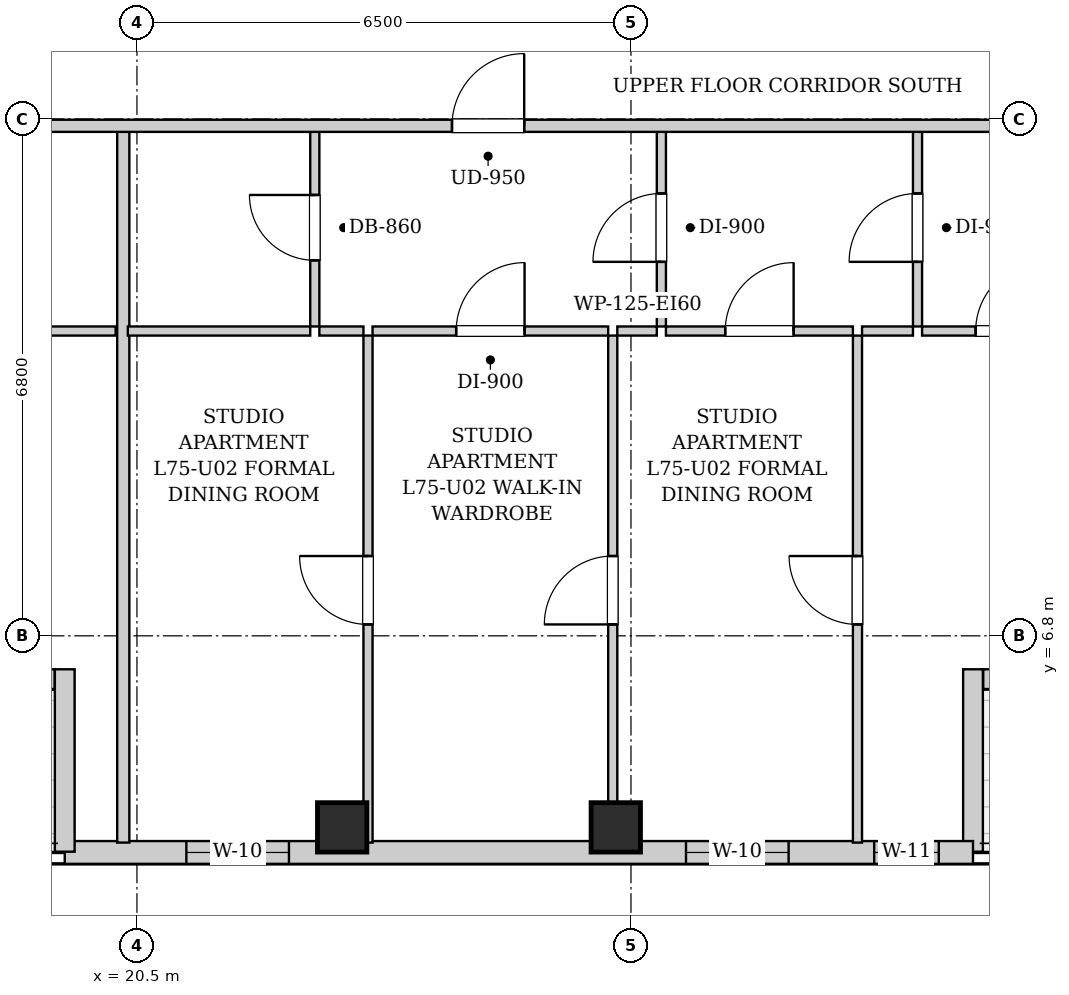
"""IFC4 building model, lengths in metres.
Left out: names, types, materials, properties, quantities, classifications, styles, units other than length and angle.
Written with IfcOpenShell. Run it as: python <this file> out.ifc"""

import sys

from ifc_helpers import new_model, si_unit, direction, frame, frame_2d, origin, origin_2d, place, context, subcontext, project, spatial, rectangle, extrude, element, fill, save


model = new_model("IFC4")
c1 = context("Model", 3, precision=1e-05, world=origin(), true_north=direction((0.0, 1.0)))
c2 = subcontext(c1, "Body", "Model", "MODEL_VIEW")
j1 = project(units=[si_unit("LENGTHUNIT", "METRE"), si_unit("PLANEANGLEUNIT", "RADIAN")], contexts=[c1])
p1 = place(None, origin())
s1 = spatial("IfcSite", under=j1, at=p1, CompositionType="ELEMENT")
p2 = place(p1, origin())
s2 = spatial("IfcBuilding", under=s1, at=p2, CompositionType="ELEMENT")
p3 = place(p2, frame((0.0, 0.0, 258.1)))
s3 = spatial("IfcBuildingStorey", under=s2, at=p3, CompositionType="ELEMENT", Elevation=258.1)
for number, where, z_axis, x_axis in (
    (1, (23.2, 4.28, 0.0), (0.0, 0.0, 1.0), (1.0, 0.0, 0.0)),
    (2, (26.8, 4.28, 0.0), (0.0, 0.0, 1.0), (1.0, 0.0, 0.0)),
):
    element("IfcColumn", number, at=place(p3, frame(where, z_axis=z_axis, x_axis=x_axis)), inside=s3, PredefinedType="COLUMN", context=c2, shape_type="SweptSolid", body=[
        extrude(rectangle(XDim=0.65, YDim=0.65, at=origin_2d()), origin(), (0.0, 0.0, 1.0), 3.4),
    ])
p4 = place(p3, frame((36.366, 6.23, 0.0), z_axis=(0.0, 0.0, 1.0), x_axis=(-1.0, 0.0, 0.0)))
e3 = element("IfcWall", 3, at=p4, inside=s3, PredefinedType="SOLIDWALL", context=c2, shape_type="SweptSolid", body=[
    extrude(rectangle(XDim=4.732, YDim=0.26, at=frame_2d((2.366, 0.0))), origin(), (0.0, 0.0, 1.0), 3.05),
])
p5 = place(p4, frame((1.816, 0.0, 0.0)))
e4 = element("IfcOpeningElement", 4, at=p5, cuts=e3, PredefinedType="OPENING", context=c2, shape_type="SweptSolid", body=[
    extrude(rectangle(XDim=1.1, YDim=2.0, at=frame_2d((0.55, 1.0))), frame((0.0, 0.14, 0.0), z_axis=(0.0, -1.0, 0.0), x_axis=(1.0, 0.0, 0.0)), (0.0, 0.0, 1.0), 0.28),
])
p6 = place(p3, frame((31.5, 6.36, 0.0), z_axis=(0.0, 0.0, 1.0), x_axis=(0.0, -1.0, 0.0)))
e5 = element("IfcWall", 5, at=p6, inside=s3, PredefinedType="SOLIDWALL", context=c2, shape_type="SweptSolid", body=[
    extrude(rectangle(XDim=2.4, YDim=0.26, at=frame_2d((1.2, 0.0))), origin(), (0.0, 0.0, 1.0), 3.05),
])
p7 = place(p3, frame((31.5, 3.95, 0.0), z_axis=(0.0, 0.0, 1.0), x_axis=(-1.0, 0.0, 0.0)))
e6 = element("IfcWall", 6, at=p7, inside=s3, PredefinedType="SOLIDWALL", context=c2, shape_type="SweptSolid", body=[
    extrude(rectangle(XDim=11.95, YDim=0.3, at=frame_2d((5.975, 0.0))), origin(), (0.0, 0.0, 1.0), 3.05),
])
p8 = place(p7, frame((9.0, 0.0, 0.55)))
e7 = element("IfcOpeningElement", 7, at=p8, cuts=e6, PredefinedType="OPENING", context=c2, shape_type="SweptSolid", body=[
    extrude(rectangle(XDim=1.35, YDim=1.2, at=frame_2d((0.675, 0.6))), frame((0.0, 0.16, 0.0), z_axis=(0.0, -1.0, 0.0), x_axis=(1.0, 0.0, 0.0)), (0.0, 0.0, 1.0), 0.32),
])
p9 = place(p7, frame((2.426, 0.0, 0.55)))
e8 = element("IfcOpeningElement", 8, at=p9, cuts=e6, PredefinedType="OPENING", context=c2, shape_type="SweptSolid", body=[
    extrude(rectangle(XDim=1.35, YDim=1.2, at=frame_2d((0.675, 0.6))), frame((0.0, 0.16, 0.0), z_axis=(0.0, -1.0, 0.0), x_axis=(1.0, 0.0, 0.0)), (0.0, 0.0, 1.0), 0.32),
])
p10 = place(p7, frame((0.45, 0.0, 0.55)))
e9 = element("IfcOpeningElement", 9, at=p10, cuts=e6, PredefinedType="OPENING", context=c2, shape_type="SweptSolid", body=[
    extrude(rectangle(XDim=0.85, YDim=1.2, at=frame_2d((0.425, 0.6))), frame((0.0, 0.16, 0.0), z_axis=(0.0, -1.0, 0.0), x_axis=(1.0, 0.0, 0.0)), (0.0, 0.0, 1.0), 0.32),
])
p11 = place(p3, frame((19.55, 3.96, 0.0), z_axis=(0.0, 0.0, 1.0), x_axis=(0.0, 1.0, 0.0)))
e10 = element("IfcWall", 10, at=p11, inside=s3, PredefinedType="SOLIDWALL", context=c2, shape_type="SweptSolid", body=[
    extrude(rectangle(XDim=2.4, YDim=0.26, at=frame_2d((1.2, 0.0))), origin(), (0.0, 0.0, 1.0), 3.05),
])
p12 = place(p3, frame((19.416, 6.23, 0.0), z_axis=(0.0, 0.0, 1.0), x_axis=(-1.0, 0.0, 0.0)))
e11 = element("IfcWall", 11, at=p12, inside=s3, PredefinedType="SOLIDWALL", context=c2, shape_type="SweptSolid", body=[
    extrude(rectangle(XDim=4.882, YDim=0.26, at=frame_2d((2.441, 0.0))), origin(), (0.0, 0.0, 1.0), 3.05),
])
p13 = place(p12, frame((1.891, 0.0, 0.0)))
e12 = element("IfcOpeningElement", 12, at=p13, cuts=e11, PredefinedType="OPENING", context=c2, shape_type="SweptSolid", body=[
    extrude(rectangle(XDim=1.1, YDim=2.0, at=frame_2d((0.55, 1.0))), frame((0.0, 0.14, 0.0), z_axis=(0.0, -1.0, 0.0), x_axis=(1.0, 0.0, 0.0)), (0.0, 0.0, 1.0), 0.28),
])
p14 = place(p3, frame((15.412, 10.81, 0.0), z_axis=(0.0, 0.0, 1.0), x_axis=(1.0, 0.0, 0.0)))
e13 = element("IfcWall", 13, at=p14, inside=s3, PredefinedType="PARTITIONING", context=c2, shape_type="SweptSolid", body=[
    extrude(rectangle(XDim=4.808, YDim=0.12, at=frame_2d((2.404, 0.0))), origin(), (0.0, 0.0, 1.0), 3.05),
])
p15 = place(p14, frame((1.954, 0.0, 0.0)))
e14 = element("IfcOpeningElement", 14, at=p15, cuts=e13, PredefinedType="OPENING", context=c2, shape_type="SweptSolid", body=[
    extrude(rectangle(XDim=0.9, YDim=2.05, at=frame_2d((0.45, 1.025))), frame((0.0, 0.07, 0.0), z_axis=(0.0, -1.0, 0.0), x_axis=(1.0, 0.0, 0.0)), (0.0, 0.0, 1.0), 0.14),
])
p16 = place(p3, frame((20.32, 4.08, 0.0), z_axis=(0.0, 0.0, 1.0), x_axis=(0.0, 1.0, 0.0)))
e15 = element("IfcWall", 15, at=p16, inside=s3, PredefinedType="PARTITIONING", context=c2, shape_type="SweptSolid", body=[
    extrude(rectangle(XDim=9.39, YDim=0.16, at=frame_2d((4.695, 0.0))), origin(), (0.0, 0.0, 1.0), 3.05),
])
p17 = place(p3, frame((22.84, 10.87, 0.0), z_axis=(0.0, 0.0, 1.0), x_axis=(0.0, 1.0, 0.0)))
e16 = element("IfcWall", 16, at=p17, inside=s3, PredefinedType="PARTITIONING", context=c2, shape_type="SweptSolid", body=[
    extrude(rectangle(XDim=2.6, YDim=0.12, at=frame_2d((1.3, 0.0))), origin(), (0.0, 0.0, 1.0), 3.05),
])
p18 = place(p17, frame((0.87, 0.0, 0.0)))
e17 = element("IfcOpeningElement", 17, at=p18, cuts=e16, PredefinedType="OPENING", context=c2, shape_type="SweptSolid", body=[
    extrude(rectangle(XDim=0.86, YDim=2.05, at=frame_2d((0.43, 1.025))), frame((0.0, 0.07, 0.0), z_axis=(0.0, -1.0, 0.0), x_axis=(1.0, 0.0, 0.0)), (0.0, 0.0, 1.0), 0.14),
])
p19 = place(p3, frame((20.38, 10.81, 0.0), z_axis=(0.0, 0.0, 1.0), x_axis=(1.0, 0.0, 0.0)))
e18 = element("IfcWall", 18, at=p19, inside=s3, PredefinedType="PARTITIONING", context=c2, shape_type="SweptSolid", body=[
    extrude(rectangle(XDim=2.4, YDim=0.12, at=frame_2d((1.2, 0.0))), origin(), (0.0, 0.0, 1.0), 3.05),
])
p20 = place(p3, frame((27.4, 10.87, 0.0), z_axis=(0.0, 0.0, 1.0), x_axis=(0.0, 1.0, 0.0)))
e19 = element("IfcWall", 19, at=p20, inside=s3, PredefinedType="PARTITIONING", context=c2, shape_type="SweptSolid", body=[
    extrude(rectangle(XDim=2.6, YDim=0.12, at=frame_2d((1.3, 0.0))), origin(), (0.0, 0.0, 1.0), 3.05),
])
p21 = place(p20, frame((0.85, 0.0, 0.0)))
e20 = element("IfcOpeningElement", 20, at=p21, cuts=e19, PredefinedType="OPENING", context=c2, shape_type="SweptSolid", body=[
    extrude(rectangle(XDim=0.9, YDim=2.05, at=frame_2d((0.45, 1.025))), frame((0.0, 0.07, 0.0), z_axis=(0.0, -1.0, 0.0), x_axis=(1.0, 0.0, 0.0)), (0.0, 0.0, 1.0), 0.14),
])
p22 = place(p3, frame((22.9, 10.81, 0.0), z_axis=(0.0, 0.0, 1.0), x_axis=(1.0, 0.0, 0.0)))
e21 = element("IfcWall", 21, at=p22, inside=s3, PredefinedType="PARTITIONING", context=c2, shape_type="SweptSolid", body=[
    extrude(rectangle(XDim=0.58, YDim=0.12, at=frame_2d((0.29, 0.0))), origin(), (0.0, 0.0, 1.0), 3.05),
])
p23 = place(p3, frame((23.6, 10.81, 0.0), z_axis=(0.0, 0.0, 1.0), x_axis=(1.0, 0.0, 0.0)))
e22 = element("IfcWall", 22, at=p23, inside=s3, PredefinedType="PARTITIONING", context=c2, shape_type="SweptSolid", body=[
    extrude(rectangle(XDim=3.1, YDim=0.12, at=frame_2d((1.55, 0.0))), origin(), (0.0, 0.0, 1.0), 3.05),
])
p24 = place(p23, frame((1.1, 0.0, 0.0)))
e23 = element("IfcOpeningElement", 23, at=p24, cuts=e22, PredefinedType="OPENING", context=c2, shape_type="SweptSolid", body=[
    extrude(rectangle(XDim=0.9, YDim=2.05, at=frame_2d((0.45, 1.025))), frame((0.0, 0.07, 0.0), z_axis=(0.0, -1.0, 0.0), x_axis=(1.0, 0.0, 0.0)), (0.0, 0.0, 1.0), 0.14),
])
p25 = place(p3, frame((26.82, 10.81, 0.0), z_axis=(0.0, 0.0, 1.0), x_axis=(1.0, 0.0, 0.0)))
e24 = element("IfcWall", 24, at=p25, inside=s3, PredefinedType="PARTITIONING", context=c2, shape_type="SweptSolid", body=[
    extrude(rectangle(XDim=0.52, YDim=0.12, at=frame_2d((0.26, 0.0))), origin(), (0.0, 0.0, 1.0), 3.05),
])
p26 = place(p3, frame((30.77, 10.87, 0.0), z_axis=(0.0, 0.0, 1.0), x_axis=(0.0, 1.0, 0.0)))
e25 = element("IfcWall", 25, at=p26, inside=s3, PredefinedType="PARTITIONING", context=c2, shape_type="SweptSolid", body=[
    extrude(rectangle(XDim=2.6, YDim=0.12, at=frame_2d((1.3, 0.0))), origin(), (0.0, 0.0, 1.0), 3.05),
])
p27 = place(p26, frame((0.85, 0.0, 0.0)))
e26 = element("IfcOpeningElement", 26, at=p27, cuts=e25, PredefinedType="OPENING", context=c2, shape_type="SweptSolid", body=[
    extrude(rectangle(XDim=0.9, YDim=2.05, at=frame_2d((0.45, 1.025))), frame((0.0, 0.07, 0.0), z_axis=(0.0, -1.0, 0.0), x_axis=(1.0, 0.0, 0.0)), (0.0, 0.0, 1.0), 0.14),
])
p28 = place(p3, frame((27.46, 10.81, 0.0), z_axis=(0.0, 0.0, 1.0), x_axis=(1.0, 0.0, 0.0)))
e27 = element("IfcWall", 27, at=p28, inside=s3, PredefinedType="PARTITIONING", context=c2, shape_type="SweptSolid", body=[
    extrude(rectangle(XDim=2.46, YDim=0.12, at=frame_2d((1.23, 0.0))), origin(), (0.0, 0.0, 1.0), 3.05),
])
p29 = place(p28, frame((0.78, 0.0, 0.0)))
e28 = element("IfcOpeningElement", 28, at=p29, cuts=e27, PredefinedType="OPENING", context=c2, shape_type="SweptSolid", body=[
    extrude(rectangle(XDim=0.9, YDim=2.05, at=frame_2d((0.45, 1.025))), frame((0.0, 0.07, 0.0), z_axis=(0.0, -1.0, 0.0), x_axis=(1.0, 0.0, 0.0)), (0.0, 0.0, 1.0), 0.14),
])
p30 = place(p3, frame((30.04, 10.81, 0.0), z_axis=(0.0, 0.0, 1.0), x_axis=(1.0, 0.0, 0.0)))
e29 = element("IfcWall", 29, at=p30, inside=s3, PredefinedType="PARTITIONING", context=c2, shape_type="SweptSolid", body=[
    extrude(rectangle(XDim=0.67, YDim=0.12, at=frame_2d((0.335, 0.0))), origin(), (0.0, 0.0, 1.0), 3.05),
])
p31 = place(p3, frame((30.83, 10.81, 0.0), z_axis=(0.0, 0.0, 1.0), x_axis=(1.0, 0.0, 0.0)))
e30 = element("IfcWall", 30, at=p31, inside=s3, PredefinedType="PARTITIONING", context=c2, shape_type="SweptSolid", body=[
    extrude(rectangle(XDim=2.31, YDim=0.12, at=frame_2d((1.155, 0.0))), origin(), (0.0, 0.0, 1.0), 3.05),
])
p32 = place(p31, frame((0.705, 0.0, 0.0)))
e31 = element("IfcOpeningElement", 31, at=p32, cuts=e30, PredefinedType="OPENING", context=c2, shape_type="SweptSolid", body=[
    extrude(rectangle(XDim=0.9, YDim=2.05, at=frame_2d((0.45, 1.025))), frame((0.0, 0.07, 0.0), z_axis=(0.0, -1.0, 0.0), x_axis=(1.0, 0.0, 0.0)), (0.0, 0.0, 1.0), 0.14),
])
p33 = place(p3, frame((23.54, 4.08, 0.0), z_axis=(0.0, 0.0, 1.0), x_axis=(0.0, 1.0, 0.0)))
e32 = element("IfcWall", 32, at=p33, inside=s3, PredefinedType="PARTITIONING", context=c2, shape_type="SweptSolid", body=[
    extrude(rectangle(XDim=6.67, YDim=0.12, at=frame_2d((3.335, 0.0))), origin(), (0.0, 0.0, 1.0), 3.05),
])
p34 = place(p33, frame((2.87, 0.0, 0.0)))
e33 = element("IfcOpeningElement", 33, at=p34, cuts=e32, PredefinedType="OPENING", context=c2, shape_type="SweptSolid", body=[
    extrude(rectangle(XDim=0.9, YDim=2.05, at=frame_2d((0.45, 1.025))), frame((0.0, 0.07, 0.0), z_axis=(0.0, -1.0, 0.0), x_axis=(1.0, 0.0, 0.0)), (0.0, 0.0, 1.0), 0.14),
])
p35 = place(p3, frame((26.76, 4.08, 0.0), z_axis=(0.0, 0.0, 1.0), x_axis=(0.0, 1.0, 0.0)))
e34 = element("IfcWall", 34, at=p35, inside=s3, PredefinedType="PARTITIONING", context=c2, shape_type="SweptSolid", body=[
    extrude(rectangle(XDim=6.67, YDim=0.12, at=frame_2d((3.335, 0.0))), origin(), (0.0, 0.0, 1.0), 3.05),
])
p36 = place(p35, frame((2.87, 0.0, 0.0)))
e35 = element("IfcOpeningElement", 35, at=p36, cuts=e34, PredefinedType="OPENING", context=c2, shape_type="SweptSolid", body=[
    extrude(rectangle(XDim=0.9, YDim=2.05, at=frame_2d((0.45, 1.025))), frame((0.0, 0.07, 0.0), z_axis=(0.0, -1.0, 0.0), x_axis=(1.0, 0.0, 0.0)), (0.0, 0.0, 1.0), 0.14),
])
p37 = place(p3, frame((29.98, 4.08, 0.0), z_axis=(0.0, 0.0, 1.0), x_axis=(0.0, 1.0, 0.0)))
e36 = element("IfcWall", 36, at=p37, inside=s3, PredefinedType="PARTITIONING", context=c2, shape_type="SweptSolid", body=[
    extrude(rectangle(XDim=6.67, YDim=0.12, at=frame_2d((3.335, 0.0))), origin(), (0.0, 0.0, 1.0), 3.05),
])
p38 = place(p37, frame((2.87, 0.0, 0.0)))
e37 = element("IfcOpeningElement", 37, at=p38, cuts=e36, PredefinedType="OPENING", context=c2, shape_type="SweptSolid", body=[
    extrude(rectangle(XDim=0.9, YDim=2.05, at=frame_2d((0.45, 1.025))), frame((0.0, 0.07, 0.0), z_axis=(0.0, -1.0, 0.0), x_axis=(1.0, 0.0, 0.0)), (0.0, 0.0, 1.0), 0.14),
])
p39 = place(p3, frame((13.15, 13.51, 0.0), z_axis=(0.0, 0.0, 1.0), x_axis=(1.0, 0.0, 0.0)))
e38 = element("IfcWall", 38, at=p39, inside=s3, PredefinedType="PARTITIONING", context=c2, shape_type="SweptSolid", body=[
    extrude(rectangle(XDim=24.6, YDim=0.16, at=frame_2d((12.3, 0.0))), origin(), (0.0, 0.0, 1.0), 3.05),
])
p40 = place(p39, frame((5.185, 0.0, 0.0)))
e39 = element("IfcOpeningElement", 39, at=p40, cuts=e38, PredefinedType="OPENING", context=c2, shape_type="SweptSolid", body=[
    extrude(rectangle(XDim=0.95, YDim=2.1, at=frame_2d((0.475, 1.05))), frame((0.0, 0.09, 0.0), z_axis=(0.0, -1.0, 0.0), x_axis=(1.0, 0.0, 0.0)), (0.0, 0.0, 1.0), 0.18),
])
p41 = place(p39, frame((11.495, 0.0, 0.0)))
e40 = element("IfcOpeningElement", 40, at=p41, cuts=e38, PredefinedType="OPENING", context=c2, shape_type="SweptSolid", body=[
    extrude(rectangle(XDim=0.95, YDim=2.1, at=frame_2d((0.475, 1.05))), frame((0.0, 0.09, 0.0), z_axis=(0.0, -1.0, 0.0), x_axis=(1.0, 0.0, 0.0)), (0.0, 0.0, 1.0), 0.18),
])
p42 = place(p18, origin())
e41 = element("IfcDoor", 41, at=p42, inside=s3, OperationType="SINGLE_SWING_RIGHT", PredefinedType="DOOR", context=c2, shape_type="SweptSolid", body=[
    extrude(rectangle(XDim=0.86, YDim=2.05, at=frame_2d((0.43, 1.025))), frame((0.0, 0.025, 0.0), z_axis=(0.0, -1.0, 0.0), x_axis=(1.0, 0.0, 0.0)), (0.0, 0.0, 1.0), 0.05),
])
fill(e17, e41)
p43 = place(p21, origin())
e42 = element("IfcDoor", 42, at=p43, inside=s3, OperationType="SINGLE_SWING_LEFT", PredefinedType="DOOR", context=c2, shape_type="SweptSolid", body=[
    extrude(rectangle(XDim=0.9, YDim=2.05, at=frame_2d((0.45, 1.025))), frame((0.0, 0.025, 0.0), z_axis=(0.0, -1.0, 0.0), x_axis=(1.0, 0.0, 0.0)), (0.0, 0.0, 1.0), 0.05),
])
fill(e20, e42)
p44 = place(p24, origin())
e43 = element("IfcDoor", 43, at=p44, inside=s3, OperationType="SINGLE_SWING_RIGHT", PredefinedType="DOOR", context=c2, shape_type="SweptSolid", body=[
    extrude(rectangle(XDim=0.9, YDim=2.05, at=frame_2d((0.45, 1.025))), frame((0.0, 0.025, 0.0), z_axis=(0.0, -1.0, 0.0), x_axis=(1.0, 0.0, 0.0)), (0.0, 0.0, 1.0), 0.05),
])
fill(e23, e43)
p45 = place(p27, origin())
e44 = element("IfcDoor", 44, at=p45, inside=s3, OperationType="SINGLE_SWING_LEFT", PredefinedType="DOOR", context=c2, shape_type="SweptSolid", body=[
    extrude(rectangle(XDim=0.9, YDim=2.05, at=frame_2d((0.45, 1.025))), frame((0.0, 0.025, 0.0), z_axis=(0.0, -1.0, 0.0), x_axis=(1.0, 0.0, 0.0)), (0.0, 0.0, 1.0), 0.05),
])
fill(e26, e44)
p46 = place(p29, origin())
e45 = element("IfcDoor", 45, at=p46, inside=s3, OperationType="SINGLE_SWING_RIGHT", PredefinedType="DOOR", context=c2, shape_type="SweptSolid", body=[
    extrude(rectangle(XDim=0.9, YDim=2.05, at=frame_2d((0.45, 1.025))), frame((0.0, 0.025, 0.0), z_axis=(0.0, -1.0, 0.0), x_axis=(1.0, 0.0, 0.0)), (0.0, 0.0, 1.0), 0.05),
])
fill(e28, e45)
p47 = place(p32, origin())
e46 = element("IfcDoor", 46, at=p47, inside=s3, OperationType="SINGLE_SWING_RIGHT", PredefinedType="DOOR", context=c2, shape_type="SweptSolid", body=[
    extrude(rectangle(XDim=0.9, YDim=2.05, at=frame_2d((0.45, 1.025))), frame((0.0, 0.025, 0.0), z_axis=(0.0, -1.0, 0.0), x_axis=(1.0, 0.0, 0.0)), (0.0, 0.0, 1.0), 0.05),
])
fill(e31, e46)
p48 = place(p34, origin())
e47 = element("IfcDoor", 47, at=p48, inside=s3, OperationType="SINGLE_SWING_RIGHT", PredefinedType="DOOR", context=c2, shape_type="SweptSolid", body=[
    extrude(rectangle(XDim=0.9, YDim=2.05, at=frame_2d((0.45, 1.025))), frame((0.0, 0.025, 0.0), z_axis=(0.0, -1.0, 0.0), x_axis=(1.0, 0.0, 0.0)), (0.0, 0.0, 1.0), 0.05),
])
fill(e33, e47)
p49 = place(p36, origin())
e48 = element("IfcDoor", 48, at=p49, inside=s3, OperationType="SINGLE_SWING_LEFT", PredefinedType="DOOR", context=c2, shape_type="SweptSolid", body=[
    extrude(rectangle(XDim=0.9, YDim=2.05, at=frame_2d((0.45, 1.025))), frame((0.0, 0.025, 0.0), z_axis=(0.0, -1.0, 0.0), x_axis=(1.0, 0.0, 0.0)), (0.0, 0.0, 1.0), 0.05),
])
fill(e35, e48)
p50 = place(p38, origin())
e49 = element("IfcDoor", 49, at=p50, inside=s3, OperationType="SINGLE_SWING_RIGHT", PredefinedType="DOOR", context=c2, shape_type="SweptSolid", body=[
    extrude(rectangle(XDim=0.9, YDim=2.05, at=frame_2d((0.45, 1.025))), frame((0.0, 0.025, 0.0), z_axis=(0.0, -1.0, 0.0), x_axis=(1.0, 0.0, 0.0)), (0.0, 0.0, 1.0), 0.05),
])
fill(e37, e49)
p51 = place(p41, origin())
e50 = element("IfcDoor", 50, at=p51, inside=s3, OperationType="SINGLE_SWING_RIGHT", PredefinedType="DOOR", context=c2, shape_type="SweptSolid", body=[
    extrude(rectangle(XDim=0.95, YDim=2.1, at=frame_2d((0.475, 1.05))), frame((0.0, 0.025, 0.0), z_axis=(0.0, -1.0, 0.0), x_axis=(1.0, 0.0, 0.0)), (0.0, 0.0, 1.0), 0.05),
])
fill(e40, e50)
p52 = place(p8, origin())
e51 = element("IfcWindow", 51, at=p52, inside=s3, PartitioningType="SINGLE_PANEL", PredefinedType="WINDOW", context=c2, shape_type="SweptSolid", body=[
    extrude(rectangle(XDim=1.35, YDim=1.2, at=frame_2d((0.675, 0.6))), frame((0.0, 0.03, 0.0), z_axis=(0.0, -1.0, 0.0), x_axis=(1.0, 0.0, 0.0)), (0.0, 0.0, 1.0), 0.06),
])
fill(e7, e51)
p53 = place(p9, origin())
e52 = element("IfcWindow", 52, at=p53, inside=s3, PartitioningType="SINGLE_PANEL", PredefinedType="WINDOW", context=c2, shape_type="SweptSolid", body=[
    extrude(rectangle(XDim=1.35, YDim=1.2, at=frame_2d((0.675, 0.6))), frame((0.0, 0.03, 0.0), z_axis=(0.0, -1.0, 0.0), x_axis=(1.0, 0.0, 0.0)), (0.0, 0.0, 1.0), 0.06),
])
fill(e8, e52)
p54 = place(p10, origin())
e53 = element("IfcWindow", 53, at=p54, inside=s3, PartitioningType="SINGLE_PANEL", PredefinedType="WINDOW", context=c2, shape_type="SweptSolid", body=[
    extrude(rectangle(XDim=0.85, YDim=1.2, at=frame_2d((0.425, 0.6))), frame((0.0, 0.03, 0.0), z_axis=(0.0, -1.0, 0.0), x_axis=(1.0, 0.0, 0.0)), (0.0, 0.0, 1.0), 0.06),
])
fill(e9, e53)
save(model, sys.argv[1])
